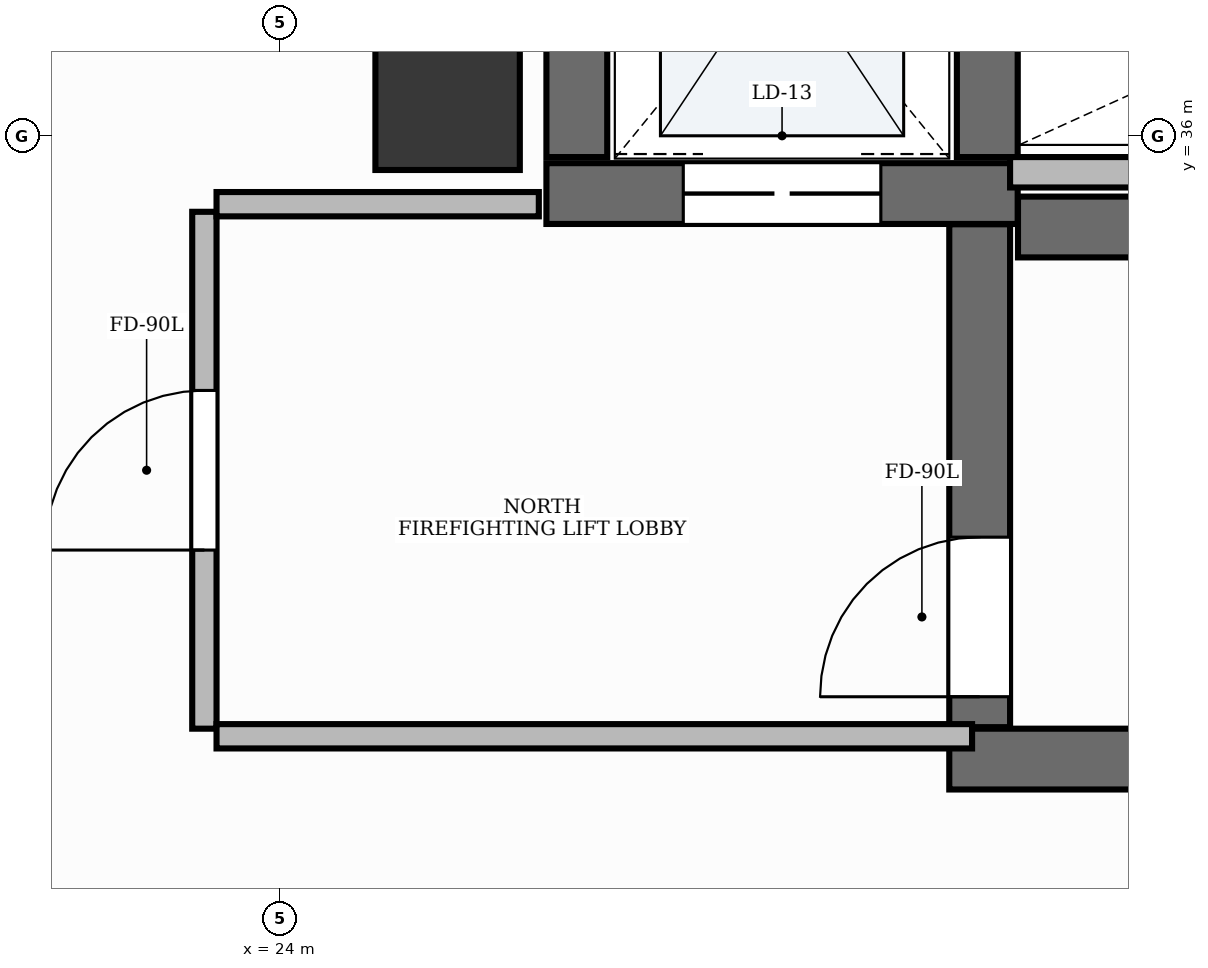
"""IFC4 building model, lengths in metres.
Left out: names, types, materials, properties, quantities, classifications, styles, units other than length and angle.
Written with IfcOpenShell. Run it as: python <this file> out.ifc"""

import sys

from ifc_helpers import new_model, si_unit, direction, frame, frame_2d, origin, origin_2d, place, context, subcontext, project, spatial, rectangle, extrude, element, fill, save


model = new_model("IFC4")
c1 = context("Model", 3, precision=1e-05, world=origin(), true_north=direction((0.0, 1.0)))
c2 = subcontext(c1, "Body", "Model", "MODEL_VIEW")
j1 = project(units=[si_unit("LENGTHUNIT", "METRE"), si_unit("PLANEANGLEUNIT", "RADIAN")], contexts=[c1])
p1 = place(None, origin())
s1 = spatial("IfcSite", under=j1, at=p1, CompositionType="ELEMENT")
p2 = place(p1, origin())
s2 = spatial("IfcBuilding", under=s1, at=p2, CompositionType="ELEMENT")
p3 = place(p2, frame((0.0, 0.0, 166.8)))
s3 = spatial("IfcBuildingStorey", under=s2, at=p3, CompositionType="ELEMENT", Elevation=166.8)
p4 = place(p3, frame((28.852, 35.4, 0.0), z_axis=(0.0, 0.0, 1.0), x_axis=(1.0, 0.0, 0.0)))
e1 = element("IfcWall", 1, at=p4, inside=s3, PredefinedType="SHEAR", context=c2, shape_type="SweptSolid", body=[
    extrude(rectangle(XDim=8.198, YDim=0.4, at=frame_2d((4.099, 0.0))), origin(), (0.0, 0.0, 1.0), 3.9),
])
p5 = place(p3, frame((28.4, 31.9, 0.0), z_axis=(0.0, 0.0, 1.0), x_axis=(1.0, 0.0, 0.0)))
e2 = element("IfcWall", 2, at=p5, inside=s3, PredefinedType="SHEAR", context=c2, shape_type="SweptSolid", body=[
    extrude(rectangle(XDim=8.65, YDim=0.4, at=frame_2d((4.325, 0.0))), origin(), (0.0, 0.0, 1.0), 3.9),
])
p6 = place(p3, frame((28.6, 32.11, 0.0), z_axis=(0.0, 0.0, 1.0), x_axis=(0.0, 1.0, 0.0)))
e3 = element("IfcWall", 3, at=p6, inside=s3, PredefinedType="SHEAR", context=c2, shape_type="SweptSolid", body=[
    extrude(rectangle(XDim=3.308, YDim=0.4, at=frame_2d((1.654, 0.0))), origin(), (0.0, 0.0, 1.0), 3.9),
])
p7 = place(p6, frame((0.2, 0.0, 0.0)))
e4 = element("IfcOpeningElement", 4, at=p7, cuts=e3, PredefinedType="OPENING", context=c2, shape_type="SweptSolid", body=[
    extrude(rectangle(XDim=1.05, YDim=2.15, at=frame_2d((0.525, 1.075))), frame((0.0, 0.215, 0.0), z_axis=(0.0, -1.0, 0.0), x_axis=(1.0, 0.0, 0.0)), (0.0, 0.0, 1.0), 0.43),
])
p8 = place(p3, frame((25.75, 35.62, 0.0), z_axis=(0.0, 0.0, 1.0), x_axis=(1.0, 0.0, 0.0)))
e5 = element("IfcWall", 5, at=p8, inside=s3, PredefinedType="SHEAR", context=c2, shape_type="SweptSolid", body=[
    extrude(rectangle(XDim=3.1, YDim=0.4, at=frame_2d((1.55, 0.0))), origin(), (0.0, 0.0, 1.0), 3.9),
])
p9 = place(p8, frame((0.9, 0.0, 0.0)))
e6 = element("IfcOpeningElement", 6, at=p9, cuts=e5, PredefinedType="OPENING", context=c2, shape_type="SweptSolid", body=[
    extrude(rectangle(XDim=1.3, YDim=2.2, at=frame_2d((0.65, 1.1))), frame((0.0, 0.215, 0.0), z_axis=(0.0, -1.0, 0.0), x_axis=(1.0, 0.0, 0.0)), (0.0, 0.0, 1.0), 0.43),
])
for number, where, z_axis, x_axis in (
    (7, (25.95, 35.86, 0.0), (0.0, 0.0, 1.0), (0.0, 1.0, 0.0)),
    (8, (28.65, 35.86, 0.0), (0.0, 0.0, 1.0), (0.0, 1.0, 0.0)),
):
    element("IfcWall", number, at=place(p3, frame(where, z_axis=z_axis, x_axis=x_axis)), inside=s3, PredefinedType="SHEAR", context=c2, shape_type="SweptSolid", body=[
        extrude(rectangle(XDim=2.7, YDim=0.4, at=frame_2d((1.35, 0.0))), origin(), (0.0, 0.0, 1.0), 3.9),
    ])
p10 = place(p3, frame((25.1, 36.25, -0.0), z_axis=(0.0, 0.0, 1.0), x_axis=(1.0, 0.0, 0.0)))
e9 = element("IfcColumn", 9, at=p10, inside=s3, PredefinedType="PILASTER", context=c2, shape_type="SweptSolid", body=[
    extrude(rectangle(XDim=0.95, YDim=0.95, at=origin_2d()), origin(), (0.0, 0.0, 1.0), 3.901),
])
p11 = place(p3, frame((28.8, 35.76, 0.0), z_axis=(0.0, 0.0, 1.0), x_axis=(1.0, 0.0, 0.0)))
e10 = element("IfcWall", 10, at=p11, inside=s3, PredefinedType="PARTITIONING", context=c2, shape_type="SweptSolid", body=[
    extrude(rectangle(XDim=4.57, YDim=0.2, at=frame_2d((2.285, 0.0))), origin(), (0.0, 0.0, 1.0), 2.91),
])
p12 = place(p3, frame((23.5, 32.1, 0.0), z_axis=(0.0, 0.0, 1.0), x_axis=(0.0, 1.0, 0.0)))
e11 = element("IfcWall", 11, at=p12, inside=s3, PredefinedType="PARTITIONING", context=c2, shape_type="SweptSolid", body=[
    extrude(rectangle(XDim=3.4, YDim=0.16, at=frame_2d((1.7, 0.0))), origin(), (0.0, 0.0, 1.0), 2.91),
])
p13 = place(p12, frame((1.175, 0.0, 0.0)))
e12 = element("IfcOpeningElement", 12, at=p13, cuts=e11, PredefinedType="OPENING", context=c2, shape_type="SweptSolid", body=[
    extrude(rectangle(XDim=1.05, YDim=2.15, at=frame_2d((0.525, 1.075))), frame((0.0, 0.095, 0.0), z_axis=(0.0, -1.0, 0.0), x_axis=(1.0, 0.0, 0.0)), (0.0, 0.0, 1.0), 0.19),
])
p14 = place(p3, frame((23.58, 32.05, 0.0), z_axis=(0.0, 0.0, 1.0), x_axis=(1.0, 0.0, 0.0)))
e13 = element("IfcWall", 13, at=p14, inside=s3, PredefinedType="PARTITIONING", context=c2, shape_type="SweptSolid", body=[
    extrude(rectangle(XDim=4.97, YDim=0.16, at=frame_2d((2.485, 0.0))), origin(), (0.0, 0.0, 1.0), 2.91),
])
p15 = place(p3, frame((23.58, 35.55, 0.0), z_axis=(0.0, 0.0, 1.0), x_axis=(1.0, 0.0, 0.0)))
e14 = element("IfcWall", 14, at=p15, inside=s3, PredefinedType="PARTITIONING", context=c2, shape_type="SweptSolid", body=[
    extrude(rectangle(XDim=2.12, YDim=0.16, at=frame_2d((1.06, 0.0))), origin(), (0.0, 0.0, 1.0), 2.91),
])
p16 = place(p7, origin())
e15 = element("IfcDoor", 15, at=p16, inside=s3, OperationType="SINGLE_SWING_LEFT", PredefinedType="DOOR", context=c2, shape_type="SweptSolid", body=[
    extrude(rectangle(XDim=1.05, YDim=2.15, at=frame_2d((0.525, 1.075))), frame((0.0, 0.025, 0.0), z_axis=(0.0, -1.0, 0.0), x_axis=(1.0, 0.0, 0.0)), (0.0, 0.0, 1.0), 0.05),
])
fill(e4, e15)
p17 = place(p9, origin())
e16 = element("IfcDoor", 16, at=p17, inside=s3, OperationType="DOUBLE_DOOR_SLIDING", PredefinedType="DOOR", context=c2, shape_type="SweptSolid", body=[
    extrude(rectangle(XDim=1.3, YDim=2.2, at=frame_2d((0.65, 1.1))), frame((0.0, 0.025, 0.0), z_axis=(0.0, -1.0, 0.0), x_axis=(1.0, 0.0, 0.0)), (0.0, 0.0, 1.0), 0.05),
])
fill(e6, e16)
p18 = place(p13, origin())
e17 = element("IfcDoor", 17, at=p18, inside=s3, OperationType="SINGLE_SWING_LEFT", PredefinedType="DOOR", context=c2, shape_type="SweptSolid", body=[
    extrude(rectangle(XDim=1.05, YDim=2.15, at=frame_2d((0.525, 1.075))), frame((0.0, 0.025, 0.0), z_axis=(0.0, -1.0, 0.0), x_axis=(1.0, 0.0, 0.0)), (0.0, 0.0, 1.0), 0.05),
])
fill(e12, e17)
save(model, sys.argv[1])
